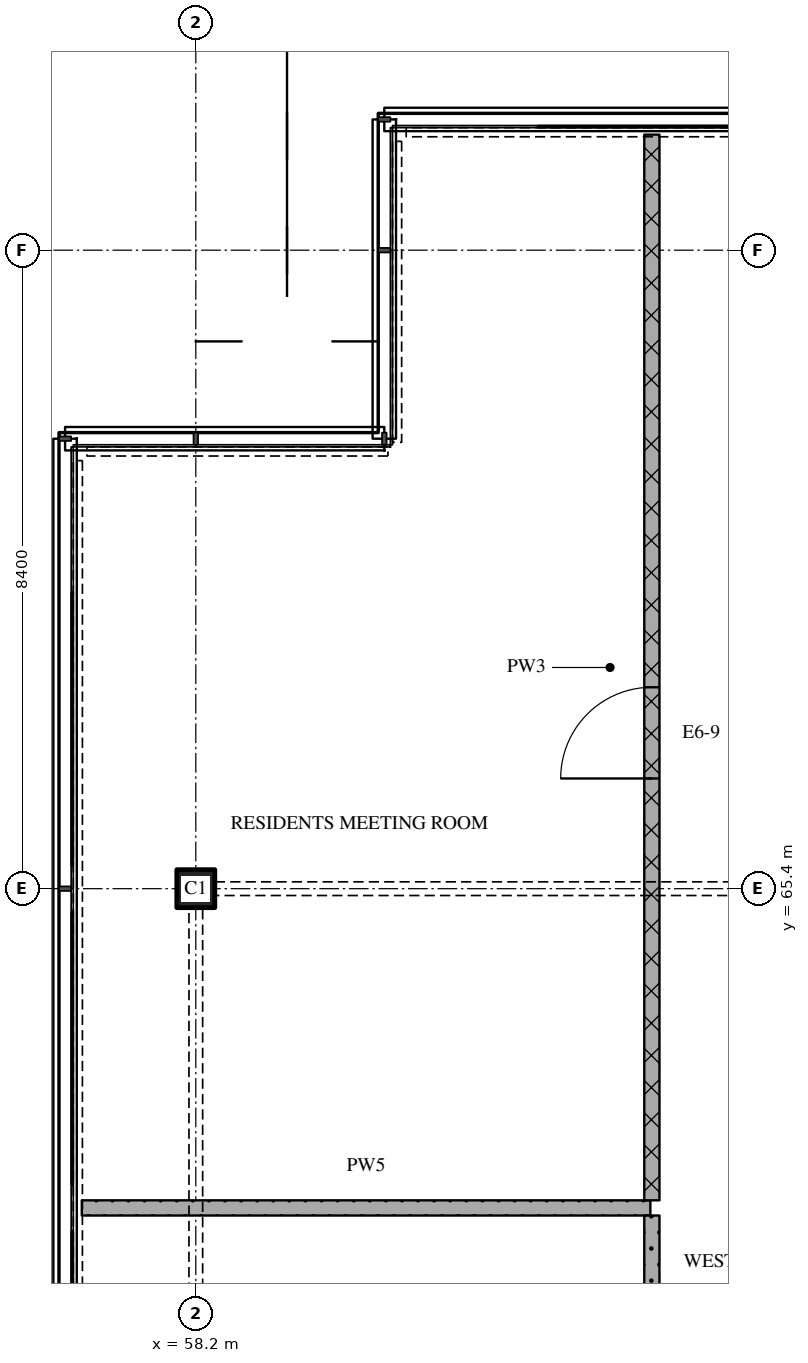
"""IFC4 building model, lengths in metres.
Left out: names, types, materials, properties, quantities, classifications, styles, units other than length and angle.
Written with IfcOpenShell. Run it as: python <this file> out.ifc"""

import sys

from ifc_helpers import new_model, si_unit, direction, frame, frame_2d, origin, origin_2d, place, context, subcontext, project, spatial, rectangle, extrude, element, fill, save


model = new_model("IFC4")
c1 = context("Model", 3, precision=1e-05, world=origin(), true_north=direction((0.0, 1.0)))
c2 = subcontext(c1, "Body", "Model", "MODEL_VIEW")
j1 = project(units=[si_unit("LENGTHUNIT", "METRE"), si_unit("PLANEANGLEUNIT", "RADIAN")], contexts=[c1])
p1 = place(None, origin())
s1 = spatial("IfcSite", under=j1, at=p1, CompositionType="ELEMENT")
p2 = place(p1, origin())
s2 = spatial("IfcBuilding", under=s1, at=p2, CompositionType="ELEMENT")
p3 = place(p2, frame((0.0, 0.0, 299.55)))
s3 = spatial("IfcBuildingStorey", under=s2, at=p3, CompositionType="ELEMENT", Elevation=299.55)
p4 = place(p3, frame((58.2, 65.4, 0.0), z_axis=(0.0, 0.0, 1.0), x_axis=(1.0, 0.0, 0.0)))
e1 = element("IfcColumn", 1, at=p4, inside=s3, PredefinedType="COLUMN", context=c2, shape_type="SweptSolid", body=[
    extrude(rectangle(XDim=0.5, YDim=0.5, at=origin_2d()), origin(), (0.0, 0.0, 1.0), 3.6),
])
p5 = place(p3, frame((56.7, 61.2, 0.0), z_axis=(0.0, 0.0, 1.0), x_axis=(1.0, 0.0, 0.0)))
e2 = element("IfcWall", 2, at=p5, inside=s3, PredefinedType="PARTITIONING", context=c2, shape_type="SweptSolid", body=[
    extrude(rectangle(XDim=7.48, YDim=0.2, at=frame_2d((3.74, 0.0))), origin(), (0.0, 0.0, 1.0), 3.32),
])
p6 = place(p3, frame((64.2, 61.3, 0.0), z_axis=(0.0, 0.0, 1.0), x_axis=(0.0, 1.0, 0.0)))
e3 = element("IfcWall", 3, at=p6, inside=s3, PredefinedType="PARTITIONING", context=c2, shape_type="SweptSolid", body=[
    extrude(rectangle(XDim=14.02, YDim=0.2, at=frame_2d((7.01, 0.0))), origin(), (0.0, 0.0, 1.0), 3.32),
])
p7 = place(p6, frame((5.55, 0.0, 0.0)))
e4 = element("IfcOpeningElement", 4, at=p7, cuts=e3, PredefinedType="OPENING", context=c2, shape_type="SweptSolid", body=[
    extrude(rectangle(XDim=1.2, YDim=2.1, at=frame_2d((0.6, 1.05))), frame((0.0, 0.11, 0.0), z_axis=(0.0, -1.0, 0.0), x_axis=(1.0, 0.0, 0.0)), (0.0, 0.0, 1.0), 0.22),
])
p8 = place(p3, frame((64.2, 61.1, 0.0), z_axis=(0.0, 0.0, 1.0), x_axis=(0.0, -1.0, 0.0)))
e5 = element("IfcWall", 5, at=p8, inside=s3, PredefinedType="PARTITIONING", context=c2, shape_type="SweptSolid", body=[
    extrude(rectangle(XDim=2.2, YDim=0.2, at=frame_2d((1.1, 0.0))), origin(), (0.0, 0.0, 1.0), 3.32),
])
p9 = place(p7, origin())
e6 = element("IfcDoor", 6, at=p9, inside=s3, OperationType="SINGLE_SWING_LEFT", PredefinedType="DOOR", context=c2, shape_type="SweptSolid", body=[
    extrude(rectangle(XDim=1.2, YDim=2.1, at=frame_2d((0.6, 1.05))), frame((0.0, 0.025, 0.0), z_axis=(0.0, -1.0, 0.0), x_axis=(1.0, 0.0, 0.0)), (0.0, 0.0, 1.0), 0.05),
])
fill(e4, e6)
save(model, sys.argv[1])
